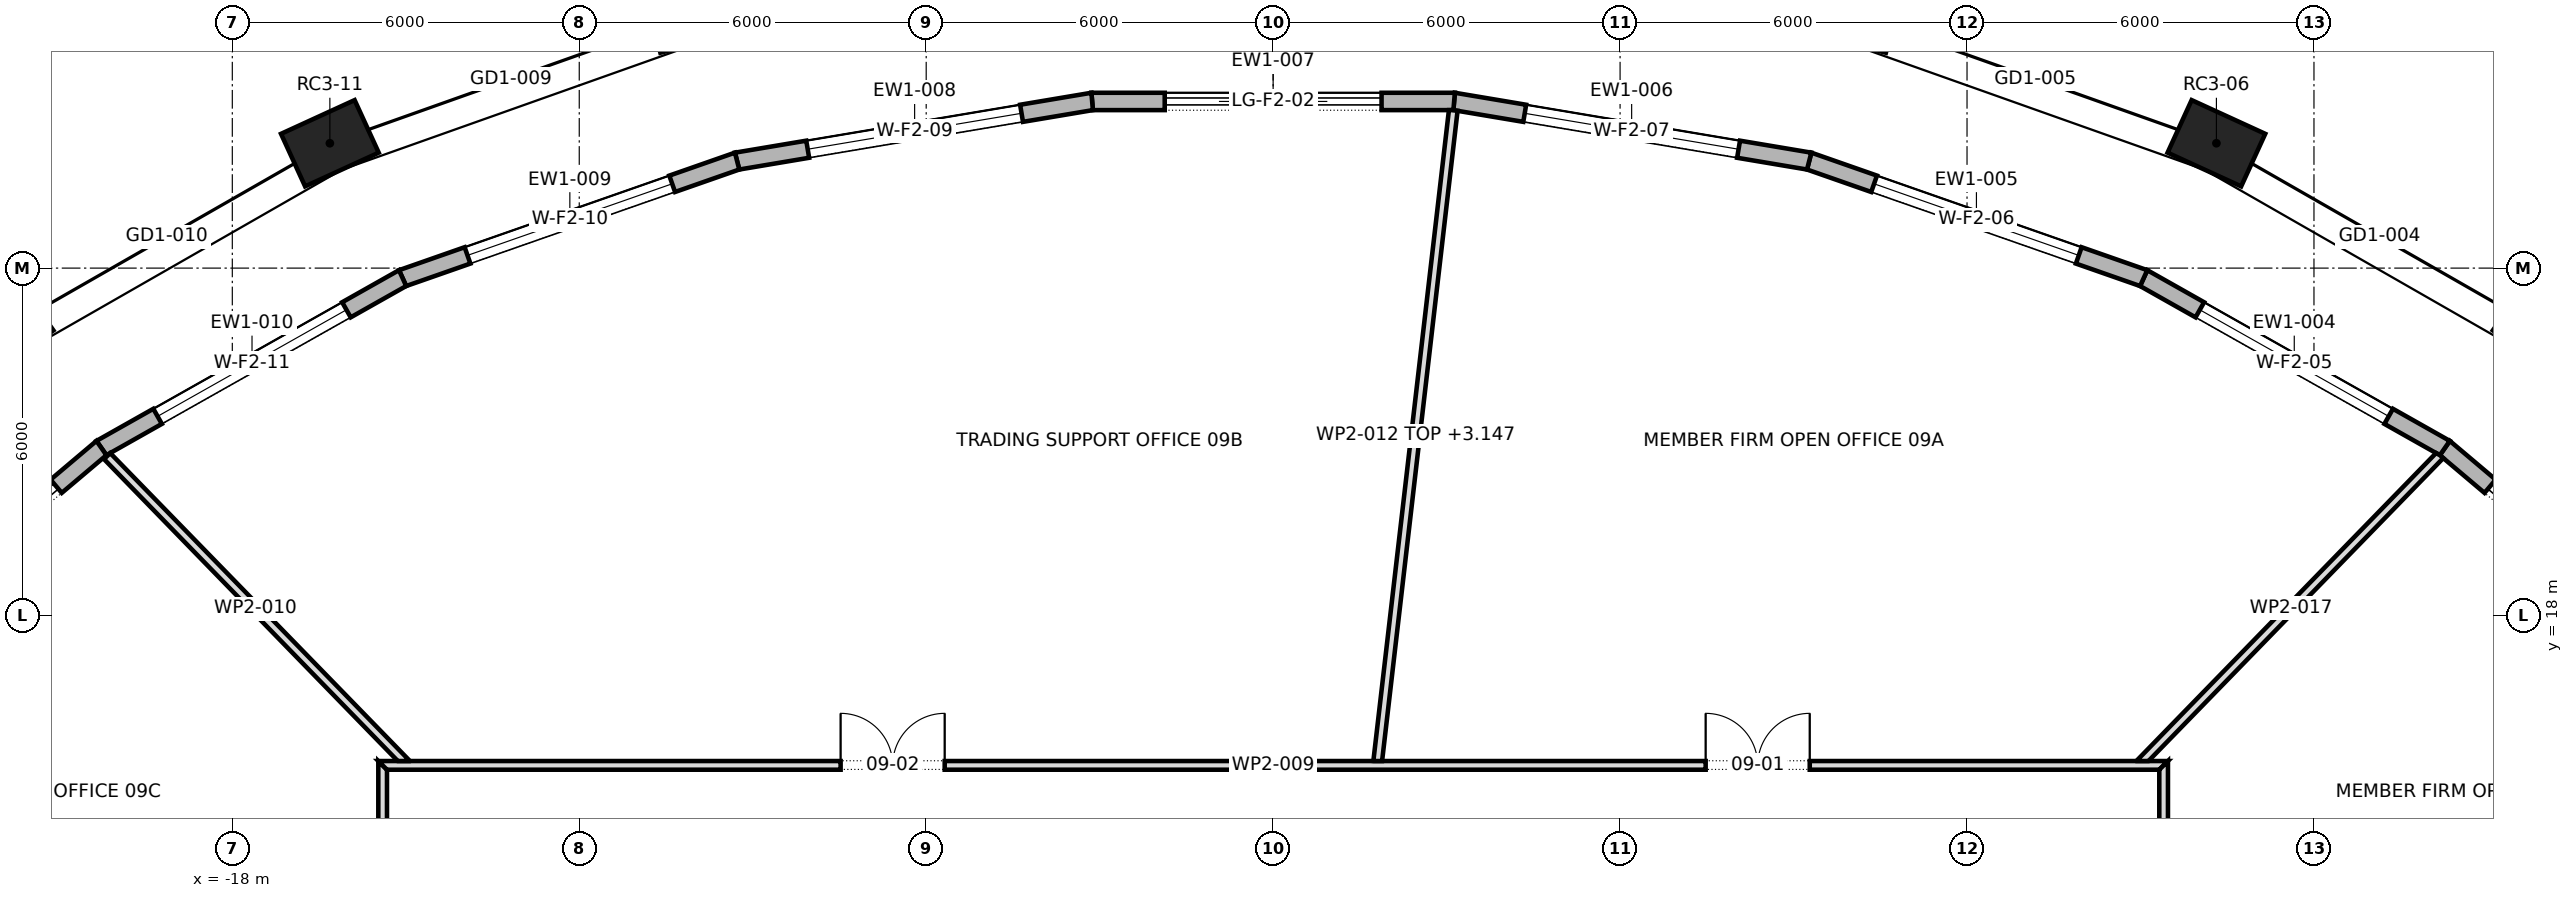
"""IFC4 building model, lengths in metres.
Left out: names, types, materials, properties, quantities, classifications, styles, units other than length and angle.
Written with IfcOpenShell. Run it as: python <this file> out.ifc"""

import sys

from ifc_helpers import new_model, si_unit, direction, frame, frame_2d, origin, origin_2d, place, context, subcontext, project, spatial, polyline, rectangle, outline, extrude, element, fill, save


model = new_model("IFC4")
c1 = context("Model", 3, precision=1e-05, world=origin(), true_north=direction((0.0, 1.0)))
c2 = subcontext(c1, "Body", "Model", "MODEL_VIEW")
j1 = project(units=[si_unit("LENGTHUNIT", "METRE"), si_unit("PLANEANGLEUNIT", "RADIAN")], contexts=[c1])
p1 = place(None, origin())
s1 = spatial("IfcSite", under=j1, at=p1, CompositionType="ELEMENT")
p2 = place(p1, origin())
s2 = spatial("IfcBuilding", under=s1, at=p2, CompositionType="ELEMENT")
p3 = place(p2, frame((0.0, 0.0, 129.7)))
s3 = spatial("IfcBuildingStorey", under=s2, at=p3, CompositionType="ELEMENT", Elevation=129.7)
for number, where, z_axis, x_axis in (
    (1, (21.953, 22.929, 0.0), (0.0, 0.0, 1.0), (-0.818, 0.575, 0.0)),
    (2, (16.313, 26.159, 0.0), (0.0, 0.0, 1.0), (-0.909, 0.417, 0.0)),
    (3, (10.045, 28.385, 0.0), (0.0, 0.0, 1.0), (-0.968, 0.252, 0.0)),
    (4, (-10.045, 28.385, 0.0), (0.0, 0.0, 1.0), (-0.968, -0.252, 0.0)),
    (5, (-16.313, 26.159, 0.0), (0.0, 0.0, 1.0), (-0.909, -0.417, 0.0)),
    (6, (-21.953, 22.929, 0.0), (0.0, 0.0, 1.0), (-0.818, -0.575, 0.0)),
):
    element("IfcColumn", number, at=place(p3, frame(where, z_axis=z_axis, x_axis=x_axis)), inside=s3, PredefinedType="COLUMN", context=c2, shape_type="SweptSolid", body=[
        extrude(rectangle(XDim=1.4, YDim=1.0, at=origin_2d()), origin(), (0.0, 0.0, 1.0), 4.2),
    ])
p4 = place(p3, frame((24.694, 17.146, 0.0), z_axis=(0.0, 0.0, 1.0), x_axis=(-0.763963973896, 0.645258898884, 0.0)))
e7 = element("IfcWall", 7, at=p4, inside=s3, PredefinedType="STANDARD", context=c2, shape_type="SweptSolid", body=[
    extrude(outline(polyline([(-0.015, -0.15), (5.814, -0.15), (5.786, 0.15), (0.015, 0.15), (-0.015, -0.15)])), origin(), (0.0, 0.0, 1.0), 3.9),
])
p5 = place(p4, frame((1.025, 0.0, 0.0)))
e8 = element("IfcOpeningElement", 8, at=p5, cuts=e7, PredefinedType="OPENING", context=c2, shape_type="SweptSolid", body=[
    extrude(rectangle(XDim=3.75, YDim=3.45, at=frame_2d((1.875, 1.725))), frame((0.0, 0.162, 0.0), z_axis=(0.0, -1.0, 0.0), x_axis=(1.0, 0.0, 0.0)), (0.0, 0.0, 1.0), 0.324),
])
p6 = place(p3, frame((20.263, 20.888, 0.0), z_axis=(0.0, 0.0, 1.0), x_axis=(-0.87090857883, 0.491445060327, 0.0)))
e9 = element("IfcWall", 9, at=p6, inside=s3, PredefinedType="STANDARD", context=c2, shape_type="SweptSolid", body=[
    extrude(outline(polyline([(-0.014, -0.15), (5.994, -0.15), (5.967, 0.15), (0.014, 0.15), (-0.014, -0.15)])), origin(), (0.0, 0.0, 1.0), 3.9),
])
p7 = place(p6, frame((1.115, 0.0, 0.6)))
e10 = element("IfcOpeningElement", 10, at=p7, cuts=e9, PredefinedType="OPENING", context=c2, shape_type="SweptSolid", body=[
    extrude(rectangle(XDim=3.75, YDim=2.85, at=frame_2d((1.875, 1.425))), frame((0.0, 0.162, 0.0), z_axis=(0.0, -1.0, 0.0), x_axis=(1.0, 0.0, 0.0)), (0.0, 0.0, 1.0), 0.324),
])
p8 = place(p3, frame((15.055, 23.827, 0.0), z_axis=(0.0, 0.0, 1.0), x_axis=(-0.943911133508, 0.330199594245, 0.0)))
e11 = element("IfcWall", 11, at=p8, inside=s3, PredefinedType="STANDARD", context=c2, shape_type="SweptSolid", body=[
    extrude(outline(polyline([(-0.013, -0.15), (6.141, -0.15), (6.116, 0.15), (0.013, 0.15), (-0.013, -0.15)])), origin(), (0.0, 0.0, 1.0), 3.9),
])
p9 = place(p8, frame((1.189, 0.0, 0.6)))
e12 = element("IfcOpeningElement", 12, at=p9, cuts=e11, PredefinedType="OPENING", context=c2, shape_type="SweptSolid", body=[
    extrude(rectangle(XDim=3.75, YDim=2.85, at=frame_2d((1.875, 1.425))), frame((0.0, 0.162, 0.0), z_axis=(0.0, -1.0, 0.0), x_axis=(1.0, 0.0, 0.0)), (0.0, 0.0, 1.0), 0.324),
])
p10 = place(p3, frame((9.27, 25.851, 0.0), z_axis=(0.0, 0.0, 1.0), x_axis=(-0.9861811474, 0.165670590368, 0.0)))
e13 = element("IfcWall", 13, at=p10, inside=s3, PredefinedType="STANDARD", context=c2, shape_type="SweptSolid", body=[
    extrude(outline(polyline([(-0.013, -0.15), (6.239, -0.15), (6.214, 0.15), (0.013, 0.15), (-0.013, -0.15)])), origin(), (0.0, 0.0, 1.0), 3.9),
])
p11 = place(p10, frame((1.238, 0.0, 0.6)))
e14 = element("IfcOpeningElement", 14, at=p11, cuts=e13, PredefinedType="OPENING", context=c2, shape_type="SweptSolid", body=[
    extrude(rectangle(XDim=3.75, YDim=2.85, at=frame_2d((1.875, 1.425))), frame((0.0, 0.162, 0.0), z_axis=(0.0, -1.0, 0.0), x_axis=(1.0, 0.0, 0.0)), (0.0, 0.0, 1.0), 0.324),
])
p12 = place(p3, frame((3.13, 26.882, 0.0), z_axis=(0.0, 0.0, 1.0), x_axis=(-1.0, 0.0, 0.0)))
e15 = element("IfcWall", 15, at=p12, inside=s3, PredefinedType="STANDARD", context=c2, shape_type="SweptSolid", body=[
    extrude(outline(polyline([(-0.012, -0.15), (6.272, -0.15), (6.247, 0.15), (0.012, 0.15), (-0.012, -0.15)])), origin(), (0.0, 0.0, 1.0), 3.9),
])
p13 = place(p12, frame((1.255, 0.0, 0.0)))
e16 = element("IfcOpeningElement", 16, at=p13, cuts=e15, PredefinedType="OPENING", context=c2, shape_type="SweptSolid", body=[
    extrude(rectangle(XDim=3.75, YDim=3.45, at=frame_2d((1.875, 1.725))), frame((0.0, 0.162, 0.0), z_axis=(0.0, -1.0, 0.0), x_axis=(1.0, 0.0, 0.0)), (0.0, 0.0, 1.0), 0.324),
])
p14 = place(p3, frame((-3.13, 26.882, 0.0), z_axis=(0.0, 0.0, 1.0), x_axis=(-0.9861811474, -0.165670590368, 0.0)))
e17 = element("IfcWall", 17, at=p14, inside=s3, PredefinedType="STANDARD", context=c2, shape_type="SweptSolid", body=[
    extrude(outline(polyline([(-0.012, -0.15), (6.239, -0.15), (6.213, 0.15), (0.012, 0.15), (-0.012, -0.15)])), origin(), (0.0, 0.0, 1.0), 3.9),
])
p15 = place(p14, frame((1.238, 0.0, 0.6)))
e18 = element("IfcOpeningElement", 18, at=p15, cuts=e17, PredefinedType="OPENING", context=c2, shape_type="SweptSolid", body=[
    extrude(rectangle(XDim=3.75, YDim=2.85, at=frame_2d((1.875, 1.425))), frame((0.0, 0.162, 0.0), z_axis=(0.0, -1.0, 0.0), x_axis=(1.0, 0.0, 0.0)), (0.0, 0.0, 1.0), 0.324),
])
p16 = place(p3, frame((-9.27, 25.851, 0.0), z_axis=(0.0, 0.0, 1.0), x_axis=(-0.943911133508, -0.330199594245, 0.0)))
e19 = element("IfcWall", 19, at=p16, inside=s3, PredefinedType="STANDARD", context=c2, shape_type="SweptSolid", body=[
    extrude(outline(polyline([(-0.013, -0.15), (6.142, -0.15), (6.115, 0.15), (0.013, 0.15), (-0.013, -0.15)])), origin(), (0.0, 0.0, 1.0), 3.9),
])
p17 = place(p16, frame((1.189, 0.0, 0.6)))
e20 = element("IfcOpeningElement", 20, at=p17, cuts=e19, PredefinedType="OPENING", context=c2, shape_type="SweptSolid", body=[
    extrude(rectangle(XDim=3.75, YDim=2.85, at=frame_2d((1.875, 1.425))), frame((0.0, 0.162, 0.0), z_axis=(0.0, -1.0, 0.0), x_axis=(1.0, 0.0, 0.0)), (0.0, 0.0, 1.0), 0.324),
])
p18 = place(p3, frame((-15.055, 23.827, 0.0), z_axis=(0.0, 0.0, 1.0), x_axis=(-0.87090857883, -0.491445060327, 0.0)))
e21 = element("IfcWall", 21, at=p18, inside=s3, PredefinedType="STANDARD", context=c2, shape_type="SweptSolid", body=[
    extrude(outline(polyline([(-0.013, -0.15), (5.994, -0.15), (5.966, 0.15), (0.013, 0.15), (-0.013, -0.15)])), origin(), (0.0, 0.0, 1.0), 3.9),
])
p19 = place(p18, frame((1.115, 0.0, 0.6)))
e22 = element("IfcOpeningElement", 22, at=p19, cuts=e21, PredefinedType="OPENING", context=c2, shape_type="SweptSolid", body=[
    extrude(rectangle(XDim=3.75, YDim=2.85, at=frame_2d((1.875, 1.425))), frame((0.0, 0.162, 0.0), z_axis=(0.0, -1.0, 0.0), x_axis=(1.0, 0.0, 0.0)), (0.0, 0.0, 1.0), 0.324),
])
p20 = place(p3, frame((-20.263, 20.888, 0.0), z_axis=(0.0, 0.0, 1.0), x_axis=(-0.763963973896, -0.645258898884, 0.0)))
e23 = element("IfcWall", 23, at=p20, inside=s3, PredefinedType="STANDARD", context=c2, shape_type="SweptSolid", body=[
    extrude(outline(polyline([(-0.014, -0.15), (5.815, -0.15), (5.785, 0.15), (0.014, 0.15), (-0.014, -0.15)])), origin(), (0.0, 0.0, 1.0), 3.9),
])
p21 = place(p20, frame((1.025, 0.0, 0.0)))
e24 = element("IfcOpeningElement", 24, at=p21, cuts=e23, PredefinedType="OPENING", context=c2, shape_type="SweptSolid", body=[
    extrude(rectangle(XDim=3.75, YDim=3.45, at=frame_2d((1.875, 1.725))), frame((0.0, 0.162, 0.0), z_axis=(0.0, -1.0, 0.0), x_axis=(1.0, 0.0, 0.0)), (0.0, 0.0, 1.0), 0.324),
])
p22 = place(p3, frame((-15.4, -3.16, 0.0), z_axis=(0.0, 0.0, 1.0), x_axis=(0.0, 1.0, 0.0)))
e25 = element("IfcWall", 25, at=p22, inside=s3, PredefinedType="PARTITIONING", context=c2, shape_type="SweptSolid", body=[
    extrude(outline(polyline([(0.0, -0.075), (1.848, -0.075), (3.697, -0.075), (5.545, -0.075), (7.394, -0.075), (9.242, -0.075), (11.091, -0.075), (12.939, -0.075), (14.788, -0.075), (16.636, -0.075), (18.485, -0.075), (18.635, 0.075), (16.771, 0.075), (14.908, 0.075), (13.044, 0.075), (11.181, 0.075), (9.317, 0.075), (7.454, 0.075), (5.59, 0.075), (3.727, 0.075), (1.864, 0.075), (0.0, 0.075), (0.0, -0.075)])), origin(), (0.0, 0.0, 1.0), 3.9),
])
p23 = place(p22, frame((11.935, 0.0, 0.0)))
e26 = element("IfcOpeningElement", 26, at=p23, cuts=e25, PredefinedType="OPENING", context=c2, shape_type="SweptSolid", body=[
    extrude(rectangle(XDim=1.8, YDim=2.1, at=frame_2d((0.9, 1.05))), frame((0.0, 0.087, 0.0), z_axis=(0.0, -1.0, 0.0), x_axis=(1.0, 0.0, 0.0)), (0.0, 0.0, 1.0), 0.174),
])
p24 = place(p22, frame((3.055, 0.0, 0.0)))
e27 = element("IfcOpeningElement", 27, at=p24, cuts=e25, PredefinedType="OPENING", context=c2, shape_type="SweptSolid", body=[
    extrude(rectangle(XDim=1.0, YDim=2.1, at=frame_2d((0.5, 1.05))), frame((0.0, 0.087, 0.0), z_axis=(0.0, -1.0, 0.0), x_axis=(1.0, 0.0, 0.0)), (0.0, 0.0, 1.0), 0.174),
])
p25 = place(p3, frame((-15.475, 15.4, 0.0), z_axis=(0.0, 0.0, 1.0), x_axis=(1.0, 0.0, 0.0)))
e28 = element("IfcWall", 28, at=p25, inside=s3, PredefinedType="PARTITIONING", context=c2, shape_type="SweptSolid", body=[
    extrude(outline(polyline([(0.15, -0.075), (2.066, -0.075), (3.981, -0.075), (5.897, -0.075), (7.812, -0.075), (9.728, -0.075), (11.644, -0.075), (13.56, -0.075), (15.475, -0.075), (17.391, -0.075), (19.306, -0.075), (21.222, -0.075), (23.138, -0.075), (25.053, -0.075), (26.969, -0.075), (28.885, -0.075), (30.8, -0.075), (30.95, 0.075), (29.016, 0.075), (27.081, 0.075), (25.147, 0.075), (23.212, 0.075), (21.278, 0.075), (19.344, 0.075), (17.409, 0.075), (15.475, 0.075), (13.541, 0.075), (11.606, 0.075), (9.672, 0.075), (7.738, 0.075), (5.803, 0.075), (3.869, 0.075), (1.935, 0.075), (0.0, 0.075), (0.15, -0.075)])), origin(), (0.0, 0.0, 1.0), 3.9),
])
p26 = place(p25, frame((22.955, 0.0, 0.0)))
e29 = element("IfcOpeningElement", 29, at=p26, cuts=e28, PredefinedType="OPENING", context=c2, shape_type="SweptSolid", body=[
    extrude(rectangle(XDim=1.8, YDim=2.1, at=frame_2d((0.9, 1.05))), frame((0.0, 0.087, 0.0), z_axis=(0.0, -1.0, 0.0), x_axis=(1.0, 0.0, 0.0)), (0.0, 0.0, 1.0), 0.174),
])
p27 = place(p25, frame((7.995, 0.0, 0.0)))
e30 = element("IfcOpeningElement", 30, at=p27, cuts=e28, PredefinedType="OPENING", context=c2, shape_type="SweptSolid", body=[
    extrude(rectangle(XDim=1.8, YDim=2.1, at=frame_2d((0.9, 1.05))), frame((0.0, 0.087, 0.0), z_axis=(0.0, -1.0, 0.0), x_axis=(1.0, 0.0, 0.0)), (0.0, 0.0, 1.0), 0.174),
])
p28 = place(p3, frame((-14.982, 15.423, 0.0), z_axis=(0.0, 0.0, 1.0), x_axis=(-0.69739829169, 0.716683767604, 0.0)))
e31 = element("IfcWall", 31, at=p28, inside=s3, PredefinedType="PARTITIONING", context=c2, shape_type="SweptSolid", body=[
    extrude(outline(polyline([(7.431, 0.075), (5.61, 0.075), (3.788, 0.075), (1.967, 0.075), (0.146, 0.075), (0.0, -0.075), (0.0, -0.075), (1.858, -0.075), (3.715, -0.075), (5.573, -0.075), (7.431, -0.075), (7.431, 0.075)])), origin(), (0.0, 0.0, 1.0), 3.9),
])
p29 = place(p3, frame((1.808, 15.467, 0.0), z_axis=(0.0, 0.0, 1.0), x_axis=(0.115308163836, 0.993329767677, 0.0)))
e32 = element("IfcWall", 32, at=p29, inside=s3, PredefinedType="PARTITIONING", context=c2, shape_type="SweptSolid", body=[
    extrude(outline(polyline([(0.017, -0.075), (1.904, -0.075), (3.791, -0.075), (5.677, -0.075), (7.564, -0.075), (9.451, -0.075), (11.338, -0.075), (11.338, -0.073), (11.338, 0.029), (11.333, 0.075), (9.444, 0.075), (7.555, 0.075), (5.667, 0.075), (3.778, 0.075), (1.889, 0.075), (0.0, 0.075), (0.0, 0.073), (0.017, -0.075)])), origin(), (0.0, 0.0, 1.0), 3.147),
])
p30 = place(p3, frame((15.4, -15.475, 0.0), z_axis=(0.0, 0.0, 1.0), x_axis=(0.0, 1.0, 0.0)))
e33 = element("IfcWall", 33, at=p30, inside=s3, PredefinedType="PARTITIONING", context=c2, shape_type="SweptSolid", body=[
    extrude(outline(polyline([(0.0, -0.075), (1.935, -0.075), (3.869, -0.075), (5.803, -0.075), (7.738, -0.075), (9.672, -0.075), (11.606, -0.075), (13.541, -0.075), (15.475, -0.075), (17.409, -0.075), (19.344, -0.075), (21.278, -0.075), (23.212, -0.075), (25.147, -0.075), (27.081, -0.075), (29.016, -0.075), (30.95, -0.075), (30.8, 0.075), (28.885, 0.075), (26.969, 0.075), (25.053, 0.075), (23.138, 0.075), (21.222, 0.075), (19.306, 0.075), (17.391, 0.075), (15.475, 0.075), (13.56, 0.075), (11.644, 0.075), (9.728, 0.075), (7.812, 0.075), (5.897, 0.075), (3.981, 0.075), (2.066, 0.075), (0.15, 0.075), (0.0, -0.075)])), origin(), (0.0, 0.0, 1.0), 3.9),
])
p31 = place(p30, frame((9.76, 0.0, 0.0)))
e34 = element("IfcOpeningElement", 34, at=p31, cuts=e33, PredefinedType="OPENING", context=c2, shape_type="SweptSolid", body=[
    extrude(rectangle(XDim=1.0, YDim=2.1, at=frame_2d((0.5, 1.05))), frame((0.0, 0.087, 0.0), z_axis=(0.0, -1.0, 0.0), x_axis=(1.0, 0.0, 0.0)), (0.0, 0.0, 1.0), 0.174),
])
p32 = place(p30, frame((15.21, 0.0, 0.0)))
e35 = element("IfcOpeningElement", 35, at=p32, cuts=e33, PredefinedType="OPENING", context=c2, shape_type="SweptSolid", body=[
    extrude(rectangle(XDim=1.0, YDim=2.1, at=frame_2d((0.5, 1.05))), frame((0.0, 0.087, 0.0), z_axis=(0.0, -1.0, 0.0), x_axis=(1.0, 0.0, 0.0)), (0.0, 0.0, 1.0), 0.174),
])
p33 = place(p30, frame((24.25, 0.0, 0.0)))
e36 = element("IfcOpeningElement", 36, at=p33, cuts=e33, PredefinedType="OPENING", context=c2, shape_type="SweptSolid", body=[
    extrude(rectangle(XDim=1.8, YDim=2.1, at=frame_2d((0.9, 1.05))), frame((0.0, 0.087, 0.0), z_axis=(0.0, -1.0, 0.0), x_axis=(1.0, 0.0, 0.0)), (0.0, 0.0, 1.0), 0.174),
])
p34 = place(p3, frame((20.182, 20.767, 0.0), z_axis=(0.0, 0.0, 1.0), x_axis=(-0.697398145205, -0.716683910148, 0.0)))
e37 = element("IfcWall", 37, at=p34, inside=s3, PredefinedType="PARTITIONING", context=c2, shape_type="SweptSolid", body=[
    extrude(outline(polyline([(7.456, -0.075), (7.456, -0.075), (7.363, 0.021), (7.363, 0.021), (7.311, 0.075), (5.483, 0.075), (3.655, 0.075), (1.828, 0.075), (0.0, 0.075), (0.0, 0.073), (0.005, -0.002), (0.024, -0.075), (1.882, -0.075), (3.74, -0.075), (5.598, -0.075), (7.456, -0.075)])), origin(), (0.0, 0.0, 1.0), 3.9),
])
p35 = place(p5, origin())
e38 = element("IfcDoor", 38, at=p35, inside=s3, OperationType="DOUBLE_DOOR_SLIDING", PredefinedType="DOOR", context=c2, shape_type="SweptSolid", body=[
    extrude(rectangle(XDim=3.75, YDim=3.45, at=frame_2d((1.875, 1.725))), frame((0.0, 0.025, 0.0), z_axis=(0.0, -1.0, 0.0), x_axis=(1.0, 0.0, 0.0)), (0.0, 0.0, 1.0), 0.05),
])
fill(e8, e38)
p36 = place(p7, origin())
e39 = element("IfcWindow", 39, at=p36, inside=s3, PartitioningType="TRIPLE_PANEL_VERTICAL", PredefinedType="WINDOW", context=c2, shape_type="SweptSolid", body=[
    extrude(rectangle(XDim=3.75, YDim=2.85, at=frame_2d((1.875, 1.425))), frame((0.0, 0.03, 0.0), z_axis=(0.0, -1.0, 0.0), x_axis=(1.0, 0.0, 0.0)), (0.0, 0.0, 1.0), 0.06),
])
fill(e10, e39)
p37 = place(p9, origin())
e40 = element("IfcWindow", 40, at=p37, inside=s3, PartitioningType="TRIPLE_PANEL_VERTICAL", PredefinedType="WINDOW", context=c2, shape_type="SweptSolid", body=[
    extrude(rectangle(XDim=3.75, YDim=2.85, at=frame_2d((1.875, 1.425))), frame((0.0, 0.03, 0.0), z_axis=(0.0, -1.0, 0.0), x_axis=(1.0, 0.0, 0.0)), (0.0, 0.0, 1.0), 0.06),
])
fill(e12, e40)
p38 = place(p11, origin())
e41 = element("IfcWindow", 41, at=p38, inside=s3, PartitioningType="TRIPLE_PANEL_VERTICAL", PredefinedType="WINDOW", context=c2, shape_type="SweptSolid", body=[
    extrude(rectangle(XDim=3.75, YDim=2.85, at=frame_2d((1.875, 1.425))), frame((0.0, 0.03, 0.0), z_axis=(0.0, -1.0, 0.0), x_axis=(1.0, 0.0, 0.0)), (0.0, 0.0, 1.0), 0.06),
])
fill(e14, e41)
p39 = place(p13, origin())
e42 = element("IfcDoor", 42, at=p39, inside=s3, OperationType="DOUBLE_DOOR_SLIDING", PredefinedType="DOOR", context=c2, shape_type="SweptSolid", body=[
    extrude(rectangle(XDim=3.75, YDim=3.45, at=frame_2d((1.875, 1.725))), frame((0.0, 0.025, 0.0), z_axis=(0.0, -1.0, 0.0), x_axis=(1.0, 0.0, 0.0)), (0.0, 0.0, 1.0), 0.05),
])
fill(e16, e42)
p40 = place(p15, origin())
e43 = element("IfcWindow", 43, at=p40, inside=s3, PartitioningType="TRIPLE_PANEL_VERTICAL", PredefinedType="WINDOW", context=c2, shape_type="SweptSolid", body=[
    extrude(rectangle(XDim=3.75, YDim=2.85, at=frame_2d((1.875, 1.425))), frame((0.0, 0.03, 0.0), z_axis=(0.0, -1.0, 0.0), x_axis=(1.0, 0.0, 0.0)), (0.0, 0.0, 1.0), 0.06),
])
fill(e18, e43)
p41 = place(p17, origin())
e44 = element("IfcWindow", 44, at=p41, inside=s3, PartitioningType="TRIPLE_PANEL_VERTICAL", PredefinedType="WINDOW", context=c2, shape_type="SweptSolid", body=[
    extrude(rectangle(XDim=3.75, YDim=2.85, at=frame_2d((1.875, 1.425))), frame((0.0, 0.03, 0.0), z_axis=(0.0, -1.0, 0.0), x_axis=(1.0, 0.0, 0.0)), (0.0, 0.0, 1.0), 0.06),
])
fill(e20, e44)
p42 = place(p19, origin())
e45 = element("IfcWindow", 45, at=p42, inside=s3, PartitioningType="TRIPLE_PANEL_VERTICAL", PredefinedType="WINDOW", context=c2, shape_type="SweptSolid", body=[
    extrude(rectangle(XDim=3.75, YDim=2.85, at=frame_2d((1.875, 1.425))), frame((0.0, 0.03, 0.0), z_axis=(0.0, -1.0, 0.0), x_axis=(1.0, 0.0, 0.0)), (0.0, 0.0, 1.0), 0.06),
])
fill(e22, e45)
p43 = place(p21, origin())
e46 = element("IfcDoor", 46, at=p43, inside=s3, OperationType="DOUBLE_DOOR_SLIDING", PredefinedType="DOOR", context=c2, shape_type="SweptSolid", body=[
    extrude(rectangle(XDim=3.75, YDim=3.45, at=frame_2d((1.875, 1.725))), frame((0.0, 0.025, 0.0), z_axis=(0.0, -1.0, 0.0), x_axis=(1.0, 0.0, 0.0)), (0.0, 0.0, 1.0), 0.05),
])
fill(e24, e46)
p44 = place(p26, origin())
e47 = element("IfcDoor", 47, at=p44, inside=s3, OperationType="DOUBLE_DOOR_SINGLE_SWING", PredefinedType="DOOR", context=c2, shape_type="SweptSolid", body=[
    extrude(rectangle(XDim=1.8, YDim=2.1, at=frame_2d((0.9, 1.05))), frame((0.0, 0.025, 0.0), z_axis=(0.0, -1.0, 0.0), x_axis=(1.0, 0.0, 0.0)), (0.0, 0.0, 1.0), 0.05),
])
fill(e29, e47)
p45 = place(p27, origin())
e48 = element("IfcDoor", 48, at=p45, inside=s3, OperationType="DOUBLE_DOOR_SINGLE_SWING", PredefinedType="DOOR", context=c2, shape_type="SweptSolid", body=[
    extrude(rectangle(XDim=1.8, YDim=2.1, at=frame_2d((0.9, 1.05))), frame((0.0, 0.025, 0.0), z_axis=(0.0, -1.0, 0.0), x_axis=(1.0, 0.0, 0.0)), (0.0, 0.0, 1.0), 0.05),
])
fill(e30, e48)
save(model, sys.argv[1])
